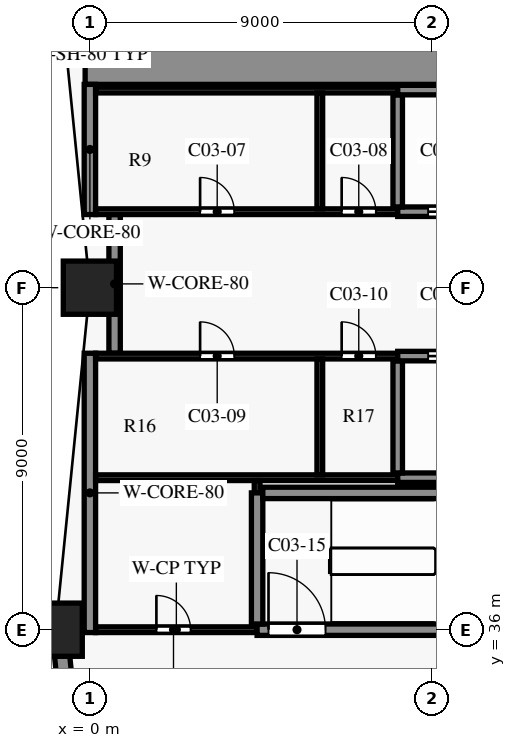
"""IFC4 building model, lengths in metres.
Left out: names, types, materials, properties, quantities, classifications, styles, units other than length and angle.
Written with IfcOpenShell. Run it as: python <this file> out.ifc"""

import sys

from ifc_helpers import new_model, si_unit, direction, frame, frame_2d, origin, origin_2d, place, context, subcontext, project, spatial, rectangle, extrude, element, fill, save


model = new_model("IFC4")
c1 = context("Model", 3, precision=1e-05, world=origin(), true_north=direction((0.0, 1.0)))
c2 = subcontext(c1, "Body", "Model", "MODEL_VIEW")
j1 = project(units=[si_unit("LENGTHUNIT", "METRE"), si_unit("PLANEANGLEUNIT", "RADIAN")], contexts=[c1])
p1 = place(None, origin())
s1 = spatial("IfcSite", under=j1, at=p1, CompositionType="ELEMENT")
p2 = place(p1, origin())
s2 = spatial("IfcBuilding", under=s1, at=p2, CompositionType="ELEMENT")
p3 = place(p2, frame((0.0, 0.0, 7.5)))
s3 = spatial("IfcBuildingStorey", under=s2, at=p3, CompositionType="ELEMENT", Elevation=7.5)
for number, where, z_axis, x_axis in (
    (1, (0.0, 45.0, 0.0), (0.0, 0.0, 1.0), (1.0, 0.0, 0.0)),
    (2, (-0.9, 36.0, 0.0), (0.0, 0.0, 1.0), (1.0, 0.0, 0.0)),
):
    element("IfcColumn", number, at=place(p3, frame(where, z_axis=z_axis, x_axis=x_axis)), inside=s3, PredefinedType="COLUMN", context=c2, shape_type="SweptSolid", body=[
        extrude(rectangle(XDim=1.4, YDim=1.4, at=origin_2d()), origin(), (0.0, 0.0, 1.0), 7.0),
    ])
p4 = place(p3, frame((0.03, 27.707, 0.0), z_axis=(0.0, 0.0, 1.0), x_axis=(-0.099478423711, 0.995039719416, 0.0)))
e3 = element("IfcWall", 3, at=p4, inside=s3, PredefinedType="SOLIDWALL", context=c2, shape_type="SweptSolid", body=[
    extrude(rectangle(XDim=7.645, YDim=0.4, at=frame_2d((3.822, 0.0))), origin(), (0.0, 0.0, 1.0), 6.1),
])
p5 = place(p4, frame((0.823, 0.0, 0.9)))
e4 = element("IfcOpeningElement", 4, at=p5, cuts=e3, PredefinedType="OPENING", context=c2, shape_type="SweptSolid", body=[
    extrude(rectangle(XDim=6.0, YDim=1.8, at=frame_2d((3.0, 0.9))), frame((0.0, 0.21, 0.0), z_axis=(0.0, -1.0, 0.0), x_axis=(1.0, 0.0, 0.0)), (0.0, 0.0, 1.0), 0.42),
])
p6 = place(p3, frame((0.15, 36.0, 0.0), z_axis=(0.0, 0.0, 1.0), x_axis=(1.0, 0.0, 0.0)))
e5 = element("IfcWall", 5, at=p6, inside=s3, PredefinedType="PARTITIONING", context=c2, shape_type="SweptSolid", body=[
    extrude(rectangle(XDim=4.25, YDim=0.15, at=frame_2d((2.125, 0.0))), origin(), (0.0, 0.0, 1.0), 6.7),
])
p7 = place(p6, frame((1.6, 0.0, 0.0)))
e6 = element("IfcOpeningElement", 6, at=p7, cuts=e5, PredefinedType="OPENING", context=c2, shape_type="SweptSolid", body=[
    extrude(rectangle(XDim=0.9, YDim=2.1, at=frame_2d((0.45, 1.05))), frame((0.0, 0.085, 0.0), z_axis=(0.0, -1.0, 0.0), x_axis=(1.0, 0.0, 0.0)), (0.0, 0.0, 1.0), 0.17),
])
p8 = place(p3, frame((4.4, 36.0, 0.0), z_axis=(0.0, 0.0, 1.0), x_axis=(1.0, 0.0, 0.0)))
e7 = element("IfcWall", 7, at=p8, inside=s3, PredefinedType="SHEAR", context=c2, shape_type="SweptSolid", body=[
    extrude(rectangle(XDim=8.0, YDim=0.3, at=frame_2d((4.0, 0.0))), origin(), (0.0, 0.0, 1.0), 6.7),
])
p9 = place(p8, frame((0.3, 0.0, 0.0)))
e8 = element("IfcOpeningElement", 8, at=p9, cuts=e7, PredefinedType="OPENING", context=c2, shape_type="SweptSolid", body=[
    extrude(rectangle(XDim=1.5, YDim=2.2, at=frame_2d((0.75, 1.1))), frame((0.0, 0.16, 0.0), z_axis=(0.0, -1.0, 0.0), x_axis=(1.0, 0.0, 0.0)), (0.0, 0.0, 1.0), 0.32),
])
p10 = place(p3, frame((4.55, 39.6, 0.0), z_axis=(0.0, 0.0, 1.0), x_axis=(1.0, 0.0, 0.0)))
e9 = element("IfcWall", 9, at=p10, inside=s3, PredefinedType="SHEAR", context=c2, shape_type="SweptSolid", body=[
    extrude(rectangle(XDim=7.7, YDim=0.3, at=frame_2d((3.85, 0.0))), origin(), (0.0, 0.0, 1.0), 6.7),
])
p11 = place(p3, frame((0.15, 40.0, 0.0), z_axis=(0.0, 0.0, 1.0), x_axis=(1.0, 0.0, 0.0)))
e10 = element("IfcWall", 10, at=p11, inside=s3, PredefinedType="PARTITIONING", context=c2, shape_type="SweptSolid", body=[
    extrude(rectangle(XDim=7.95, YDim=0.15, at=frame_2d((3.975, 0.0))), origin(), (0.0, 0.0, 1.0), 6.7),
])
p12 = place(p3, frame((8.1, 40.0, 0.0), z_axis=(0.0, 0.0, 1.0), x_axis=(1.0, 0.0, 0.0)))
e11 = element("IfcWall", 11, at=p12, inside=s3, PredefinedType="SHEAR", context=c2, shape_type="SweptSolid", body=[
    extrude(rectangle(XDim=16.075, YDim=0.25, at=frame_2d((8.038, 0.0))), origin(), (0.0, 0.0, 1.0), 6.7),
])
p13 = place(p3, frame((0.15, 43.2, 0.0), z_axis=(0.0, 0.0, 1.0), x_axis=(1.0, 0.0, 0.0)))
e12 = element("IfcWall", 12, at=p13, inside=s3, PredefinedType="PARTITIONING", context=c2, shape_type="SweptSolid", body=[
    extrude(rectangle(XDim=7.95, YDim=0.15, at=frame_2d((3.975, 0.0))), origin(), (0.0, 0.0, 1.0), 6.7),
])
p14 = place(p13, frame((2.75, 0.0, 0.0)))
e13 = element("IfcOpeningElement", 13, at=p14, cuts=e12, PredefinedType="OPENING", context=c2, shape_type="SweptSolid", body=[
    extrude(rectangle(XDim=0.9, YDim=2.1, at=frame_2d((0.45, 1.05))), frame((0.0, 0.085, 0.0), z_axis=(0.0, -1.0, 0.0), x_axis=(1.0, 0.0, 0.0)), (0.0, 0.0, 1.0), 0.17),
])
p15 = place(p13, frame((6.475, 0.0, 0.0)))
e14 = element("IfcOpeningElement", 14, at=p15, cuts=e12, PredefinedType="OPENING", context=c2, shape_type="SweptSolid", body=[
    extrude(rectangle(XDim=0.9, YDim=2.1, at=frame_2d((0.45, 1.05))), frame((0.0, 0.085, 0.0), z_axis=(0.0, -1.0, 0.0), x_axis=(1.0, 0.0, 0.0)), (0.0, 0.0, 1.0), 0.17),
])
p16 = place(p3, frame((8.1, 43.2, 0.0), z_axis=(0.0, 0.0, 1.0), x_axis=(1.0, 0.0, 0.0)))
e15 = element("IfcWall", 15, at=p16, inside=s3, PredefinedType="SHEAR", context=c2, shape_type="SweptSolid", body=[
    extrude(rectangle(XDim=16.075, YDim=0.25, at=frame_2d((8.038, 0.0))), origin(), (0.0, 0.0, 1.0), 6.7),
])
p17 = place(p16, frame((14.3, 0.0, 0.0)))
e16 = element("IfcOpeningElement", 16, at=p17, cuts=e15, PredefinedType="OPENING", context=c2, shape_type="SweptSolid", body=[
    extrude(rectangle(XDim=1.1, YDim=2.1, at=frame_2d((0.55, 1.05))), frame((0.0, 0.135, 0.0), z_axis=(0.0, -1.0, 0.0), x_axis=(1.0, 0.0, 0.0)), (0.0, 0.0, 1.0), 0.27),
])
p18 = place(p16, frame((0.8, 0.0, 0.0)))
e17 = element("IfcOpeningElement", 17, at=p18, cuts=e15, PredefinedType="OPENING", context=c2, shape_type="SweptSolid", body=[
    extrude(rectangle(XDim=1.1, YDim=2.1, at=frame_2d((0.55, 1.05))), frame((0.0, 0.135, 0.0), z_axis=(0.0, -1.0, 0.0), x_axis=(1.0, 0.0, 0.0)), (0.0, 0.0, 1.0), 0.27),
])
p19 = place(p16, frame((3.5, 0.0, 0.0)))
e18 = element("IfcOpeningElement", 18, at=p19, cuts=e15, PredefinedType="OPENING", context=c2, shape_type="SweptSolid", body=[
    extrude(rectangle(XDim=1.1, YDim=2.1, at=frame_2d((0.55, 1.05))), frame((0.0, 0.135, 0.0), z_axis=(0.0, -1.0, 0.0), x_axis=(1.0, 0.0, 0.0)), (0.0, 0.0, 1.0), 0.27),
])
p20 = place(p16, frame((6.2, 0.0, 0.0)))
e19 = element("IfcOpeningElement", 19, at=p20, cuts=e15, PredefinedType="OPENING", context=c2, shape_type="SweptSolid", body=[
    extrude(rectangle(XDim=1.1, YDim=2.1, at=frame_2d((0.55, 1.05))), frame((0.0, 0.135, 0.0), z_axis=(0.0, -1.0, 0.0), x_axis=(1.0, 0.0, 0.0)), (0.0, 0.0, 1.0), 0.27),
])
p21 = place(p16, frame((8.9, 0.0, 0.0)))
e20 = element("IfcOpeningElement", 20, at=p21, cuts=e15, PredefinedType="OPENING", context=c2, shape_type="SweptSolid", body=[
    extrude(rectangle(XDim=1.1, YDim=2.1, at=frame_2d((0.55, 1.05))), frame((0.0, 0.135, 0.0), z_axis=(0.0, -1.0, 0.0), x_axis=(1.0, 0.0, 0.0)), (0.0, 0.0, 1.0), 0.27),
])
p22 = place(p16, frame((11.6, 0.0, 0.0)))
e21 = element("IfcOpeningElement", 21, at=p22, cuts=e15, PredefinedType="OPENING", context=c2, shape_type="SweptSolid", body=[
    extrude(rectangle(XDim=1.1, YDim=2.1, at=frame_2d((0.55, 1.05))), frame((0.0, 0.135, 0.0), z_axis=(0.0, -1.0, 0.0), x_axis=(1.0, 0.0, 0.0)), (0.0, 0.0, 1.0), 0.27),
])
p23 = place(p3, frame((0.15, 47.0, 0.0), z_axis=(0.0, 0.0, 1.0), x_axis=(1.0, 0.0, 0.0)))
e22 = element("IfcWall", 22, at=p23, inside=s3, PredefinedType="PARTITIONING", context=c2, shape_type="SweptSolid", body=[
    extrude(rectangle(XDim=7.95, YDim=0.15, at=frame_2d((3.975, 0.0))), origin(), (0.0, 0.0, 1.0), 6.7),
])
p24 = place(p23, frame((2.75, 0.0, 0.0)))
e23 = element("IfcOpeningElement", 23, at=p24, cuts=e22, PredefinedType="OPENING", context=c2, shape_type="SweptSolid", body=[
    extrude(rectangle(XDim=0.9, YDim=2.1, at=frame_2d((0.45, 1.05))), frame((0.0, 0.085, 0.0), z_axis=(0.0, -1.0, 0.0), x_axis=(1.0, 0.0, 0.0)), (0.0, 0.0, 1.0), 0.17),
])
p25 = place(p23, frame((6.475, 0.0, 0.0)))
e24 = element("IfcOpeningElement", 24, at=p25, cuts=e22, PredefinedType="OPENING", context=c2, shape_type="SweptSolid", body=[
    extrude(rectangle(XDim=0.9, YDim=2.1, at=frame_2d((0.45, 1.05))), frame((0.0, 0.085, 0.0), z_axis=(0.0, -1.0, 0.0), x_axis=(1.0, 0.0, 0.0)), (0.0, 0.0, 1.0), 0.17),
])
p26 = place(p3, frame((8.1, 47.0, 0.0), z_axis=(0.0, 0.0, 1.0), x_axis=(1.0, 0.0, 0.0)))
e25 = element("IfcWall", 25, at=p26, inside=s3, PredefinedType="SHEAR", context=c2, shape_type="SweptSolid", body=[
    extrude(rectangle(XDim=13.5, YDim=0.25, at=frame_2d((6.75, 0.0))), origin(), (0.0, 0.0, 1.0), 6.7),
])
p27 = place(p26, frame((0.8, 0.0, 0.0)))
e26 = element("IfcOpeningElement", 26, at=p27, cuts=e25, PredefinedType="OPENING", context=c2, shape_type="SweptSolid", body=[
    extrude(rectangle(XDim=1.1, YDim=2.1, at=frame_2d((0.55, 1.05))), frame((0.0, 0.135, 0.0), z_axis=(0.0, -1.0, 0.0), x_axis=(1.0, 0.0, 0.0)), (0.0, 0.0, 1.0), 0.27),
])
p28 = place(p26, frame((3.5, 0.0, 0.0)))
e27 = element("IfcOpeningElement", 27, at=p28, cuts=e25, PredefinedType="OPENING", context=c2, shape_type="SweptSolid", body=[
    extrude(rectangle(XDim=1.1, YDim=2.1, at=frame_2d((0.55, 1.05))), frame((0.0, 0.135, 0.0), z_axis=(0.0, -1.0, 0.0), x_axis=(1.0, 0.0, 0.0)), (0.0, 0.0, 1.0), 0.27),
])
p29 = place(p26, frame((6.2, 0.0, 0.0)))
e28 = element("IfcOpeningElement", 28, at=p29, cuts=e25, PredefinedType="OPENING", context=c2, shape_type="SweptSolid", body=[
    extrude(rectangle(XDim=1.1, YDim=2.1, at=frame_2d((0.55, 1.05))), frame((0.0, 0.135, 0.0), z_axis=(0.0, -1.0, 0.0), x_axis=(1.0, 0.0, 0.0)), (0.0, 0.0, 1.0), 0.27),
])
p30 = place(p26, frame((8.9, 0.0, 0.0)))
e29 = element("IfcOpeningElement", 29, at=p30, cuts=e25, PredefinedType="OPENING", context=c2, shape_type="SweptSolid", body=[
    extrude(rectangle(XDim=1.1, YDim=2.1, at=frame_2d((0.55, 1.05))), frame((0.0, 0.135, 0.0), z_axis=(0.0, -1.0, 0.0), x_axis=(1.0, 0.0, 0.0)), (0.0, 0.0, 1.0), 0.27),
])
p31 = place(p26, frame((11.6, 0.0, 0.0)))
e30 = element("IfcOpeningElement", 30, at=p31, cuts=e25, PredefinedType="OPENING", context=c2, shape_type="SweptSolid", body=[
    extrude(rectangle(XDim=1.1, YDim=2.1, at=frame_2d((0.55, 1.05))), frame((0.0, 0.135, 0.0), z_axis=(0.0, -1.0, 0.0), x_axis=(1.0, 0.0, 0.0)), (0.0, 0.0, 1.0), 0.27),
])
p32 = place(p3, frame((0.15, 50.2, 0.0), z_axis=(0.0, 0.0, 1.0), x_axis=(1.0, 0.0, 0.0)))
e31 = element("IfcWall", 31, at=p32, inside=s3, PredefinedType="PARTITIONING", context=c2, shape_type="SweptSolid", body=[
    extrude(rectangle(XDim=7.95, YDim=0.15, at=frame_2d((3.975, 0.0))), origin(), (0.0, 0.0, 1.0), 6.7),
])
p33 = place(p3, frame((8.1, 50.2, 0.0), z_axis=(0.0, 0.0, 1.0), x_axis=(1.0, 0.0, 0.0)))
e32 = element("IfcWall", 32, at=p33, inside=s3, PredefinedType="SHEAR", context=c2, shape_type="SweptSolid", body=[
    extrude(rectangle(XDim=13.375, YDim=0.25, at=frame_2d((6.688, 0.0))), origin(), (0.0, 0.0, 1.0), 6.7),
])
p34 = place(p3, frame((-0.125, 51.0, 0.0), z_axis=(0.0, 0.0, 1.0), x_axis=(1.0, 0.0, 0.0)))
e33 = element("IfcWall", 33, at=p34, inside=s3, PredefinedType="SHEAR", context=c2, shape_type="SweptSolid", body=[
    extrude(rectangle(XDim=21.625, YDim=1.3, at=frame_2d((10.812, 0.0))), origin(), (0.0, 0.0, 1.0), 6.7),
])
p35 = place(p3, frame((0.0, 35.925, 0.0), z_axis=(0.0, 0.0, 1.0), x_axis=(0.0, 1.0, 0.0)))
e34 = element("IfcWall", 34, at=p35, inside=s3, PredefinedType="SHEAR", context=c2, shape_type="SweptSolid", body=[
    extrude(rectangle(XDim=7.35, YDim=0.3, at=frame_2d((3.675, 0.0))), origin(), (0.0, 0.0, 1.0), 6.7),
])
p36 = place(p3, frame((0.0, 46.925, 0.0), z_axis=(0.0, 0.0, 1.0), x_axis=(0.0, 1.0, 0.0)))
e35 = element("IfcWall", 35, at=p36, inside=s3, PredefinedType="SHEAR", context=c2, shape_type="SweptSolid", body=[
    extrude(rectangle(XDim=3.425, YDim=0.3, at=frame_2d((1.712, 0.0))), origin(), (0.0, 0.0, 1.0), 6.7),
])
p37 = place(p3, frame((0.65, 43.275, 0.0), z_axis=(0.0, 0.0, 1.0), x_axis=(0.0, 1.0, 0.0)))
e36 = element("IfcWall", 36, at=p37, inside=s3, PredefinedType="SHEAR", context=c2, shape_type="SweptSolid", body=[
    extrude(rectangle(XDim=3.65, YDim=0.3, at=frame_2d((1.825, 0.0))), origin(), (0.0, 0.0, 1.0), 6.7),
])
p38 = place(p3, frame((4.4, 39.6, 0.0), z_axis=(0.0, 0.0, 1.0), x_axis=(0.0, 1.0, 0.0)))
e37 = element("IfcWall", 37, at=p38, inside=s3, PredefinedType="PARTITIONING", context=c2, shape_type="SweptSolid", body=[
    extrude(rectangle(XDim=0.325, YDim=0.15, at=frame_2d((0.163, 0.0))), origin(), (0.0, 0.0, 1.0), 6.7),
])
p39 = place(p3, frame((4.4, 36.15, 0.0), z_axis=(0.0, 0.0, 1.0), x_axis=(0.0, 1.0, 0.0)))
e38 = element("IfcWall", 38, at=p39, inside=s3, PredefinedType="SHEAR", context=c2, shape_type="SweptSolid", body=[
    extrude(rectangle(XDim=3.45, YDim=0.3, at=frame_2d((1.725, 0.0))), origin(), (0.0, 0.0, 1.0), 6.7),
])
for number, where, z_axis, x_axis in (
    (39, (6.05, 40.075, 0.0), (0.0, 0.0, 1.0), (0.0, 1.0, 0.0)),
    (40, (6.05, 47.075, 0.0), (0.0, 0.0, 1.0), (0.0, 1.0, 0.0)),
):
    element("IfcWall", number, at=place(p3, frame(where, z_axis=z_axis, x_axis=x_axis)), inside=s3, PredefinedType="PARTITIONING", context=c2, shape_type="SweptSolid", body=[
        extrude(rectangle(XDim=3.05, YDim=0.15, at=frame_2d((1.525, 0.0))), origin(), (0.0, 0.0, 1.0), 6.7),
    ])
for number, where, z_axis, x_axis in (
    (41, (8.1, 40.125, 0.0), (0.0, 0.0, 1.0), (0.0, 1.0, 0.0)),
    (42, (8.1, 47.125, 0.0), (0.0, 0.0, 1.0), (0.0, 1.0, 0.0)),
):
    element("IfcWall", number, at=place(p3, frame(where, z_axis=z_axis, x_axis=x_axis)), inside=s3, PredefinedType="SHEAR", context=c2, shape_type="SweptSolid", body=[
        extrude(rectangle(XDim=2.95, YDim=0.25, at=frame_2d((1.475, 0.0))), origin(), (0.0, 0.0, 1.0), 6.7),
    ])
p40 = place(p7, origin())
e43 = element("IfcDoor", 43, at=p40, inside=s3, OperationType="SINGLE_SWING_LEFT", PredefinedType="DOOR", context=c2, shape_type="SweptSolid", body=[
    extrude(rectangle(XDim=0.9, YDim=2.1, at=frame_2d((0.45, 1.05))), frame((0.0, 0.025, 0.0), z_axis=(0.0, -1.0, 0.0), x_axis=(1.0, 0.0, 0.0)), (0.0, 0.0, 1.0), 0.05),
])
fill(e6, e43)
p41 = place(p24, origin())
e44 = element("IfcDoor", 44, at=p41, inside=s3, OperationType="SINGLE_SWING_RIGHT", PredefinedType="DOOR", context=c2, shape_type="SweptSolid", body=[
    extrude(rectangle(XDim=0.9, YDim=2.1, at=frame_2d((0.45, 1.05))), frame((0.0, 0.025, 0.0), z_axis=(0.0, -1.0, 0.0), x_axis=(1.0, 0.0, 0.0)), (0.0, 0.0, 1.0), 0.05),
])
fill(e23, e44)
p42 = place(p25, origin())
e45 = element("IfcDoor", 45, at=p42, inside=s3, OperationType="SINGLE_SWING_LEFT", PredefinedType="DOOR", context=c2, shape_type="SweptSolid", body=[
    extrude(rectangle(XDim=0.9, YDim=2.1, at=frame_2d((0.45, 1.05))), frame((0.0, 0.025, 0.0), z_axis=(0.0, -1.0, 0.0), x_axis=(1.0, 0.0, 0.0)), (0.0, 0.0, 1.0), 0.05),
])
fill(e24, e45)
p43 = place(p14, origin())
e46 = element("IfcDoor", 46, at=p43, inside=s3, OperationType="SINGLE_SWING_LEFT", PredefinedType="DOOR", context=c2, shape_type="SweptSolid", body=[
    extrude(rectangle(XDim=0.9, YDim=2.1, at=frame_2d((0.45, 1.05))), frame((0.0, 0.025, 0.0), z_axis=(0.0, -1.0, 0.0), x_axis=(1.0, 0.0, 0.0)), (0.0, 0.0, 1.0), 0.05),
])
fill(e13, e46)
p44 = place(p15, origin())
e47 = element("IfcDoor", 47, at=p44, inside=s3, OperationType="SINGLE_SWING_RIGHT", PredefinedType="DOOR", context=c2, shape_type="SweptSolid", body=[
    extrude(rectangle(XDim=0.9, YDim=2.1, at=frame_2d((0.45, 1.05))), frame((0.0, 0.025, 0.0), z_axis=(0.0, -1.0, 0.0), x_axis=(1.0, 0.0, 0.0)), (0.0, 0.0, 1.0), 0.05),
])
fill(e14, e47)
p45 = place(p9, origin())
e48 = element("IfcDoor", 48, at=p45, inside=s3, OperationType="SINGLE_SWING_RIGHT", PredefinedType="DOOR", context=c2, shape_type="SweptSolid", body=[
    extrude(rectangle(XDim=1.5, YDim=2.2, at=frame_2d((0.75, 1.1))), frame((0.0, 0.025, 0.0), z_axis=(0.0, -1.0, 0.0), x_axis=(1.0, 0.0, 0.0)), (0.0, 0.0, 1.0), 0.05),
])
fill(e8, e48)
p46 = place(p18, origin())
e49 = element("IfcDoor", 49, at=p46, inside=s3, OperationType="DOUBLE_DOOR_SLIDING", PredefinedType="DOOR", context=c2, shape_type="SweptSolid", body=[
    extrude(rectangle(XDim=1.1, YDim=2.1, at=frame_2d((0.55, 1.05))), frame((0.0, 0.025, 0.0), z_axis=(0.0, -1.0, 0.0), x_axis=(1.0, 0.0, 0.0)), (0.0, 0.0, 1.0), 0.05),
])
fill(e17, e49)
p47 = place(p27, origin())
e50 = element("IfcDoor", 50, at=p47, inside=s3, OperationType="DOUBLE_DOOR_SLIDING", PredefinedType="DOOR", context=c2, shape_type="SweptSolid", body=[
    extrude(rectangle(XDim=1.1, YDim=2.1, at=frame_2d((0.55, 1.05))), frame((0.0, 0.025, 0.0), z_axis=(0.0, -1.0, 0.0), x_axis=(1.0, 0.0, 0.0)), (0.0, 0.0, 1.0), 0.05),
])
fill(e26, e50)
save(model, sys.argv[1])
